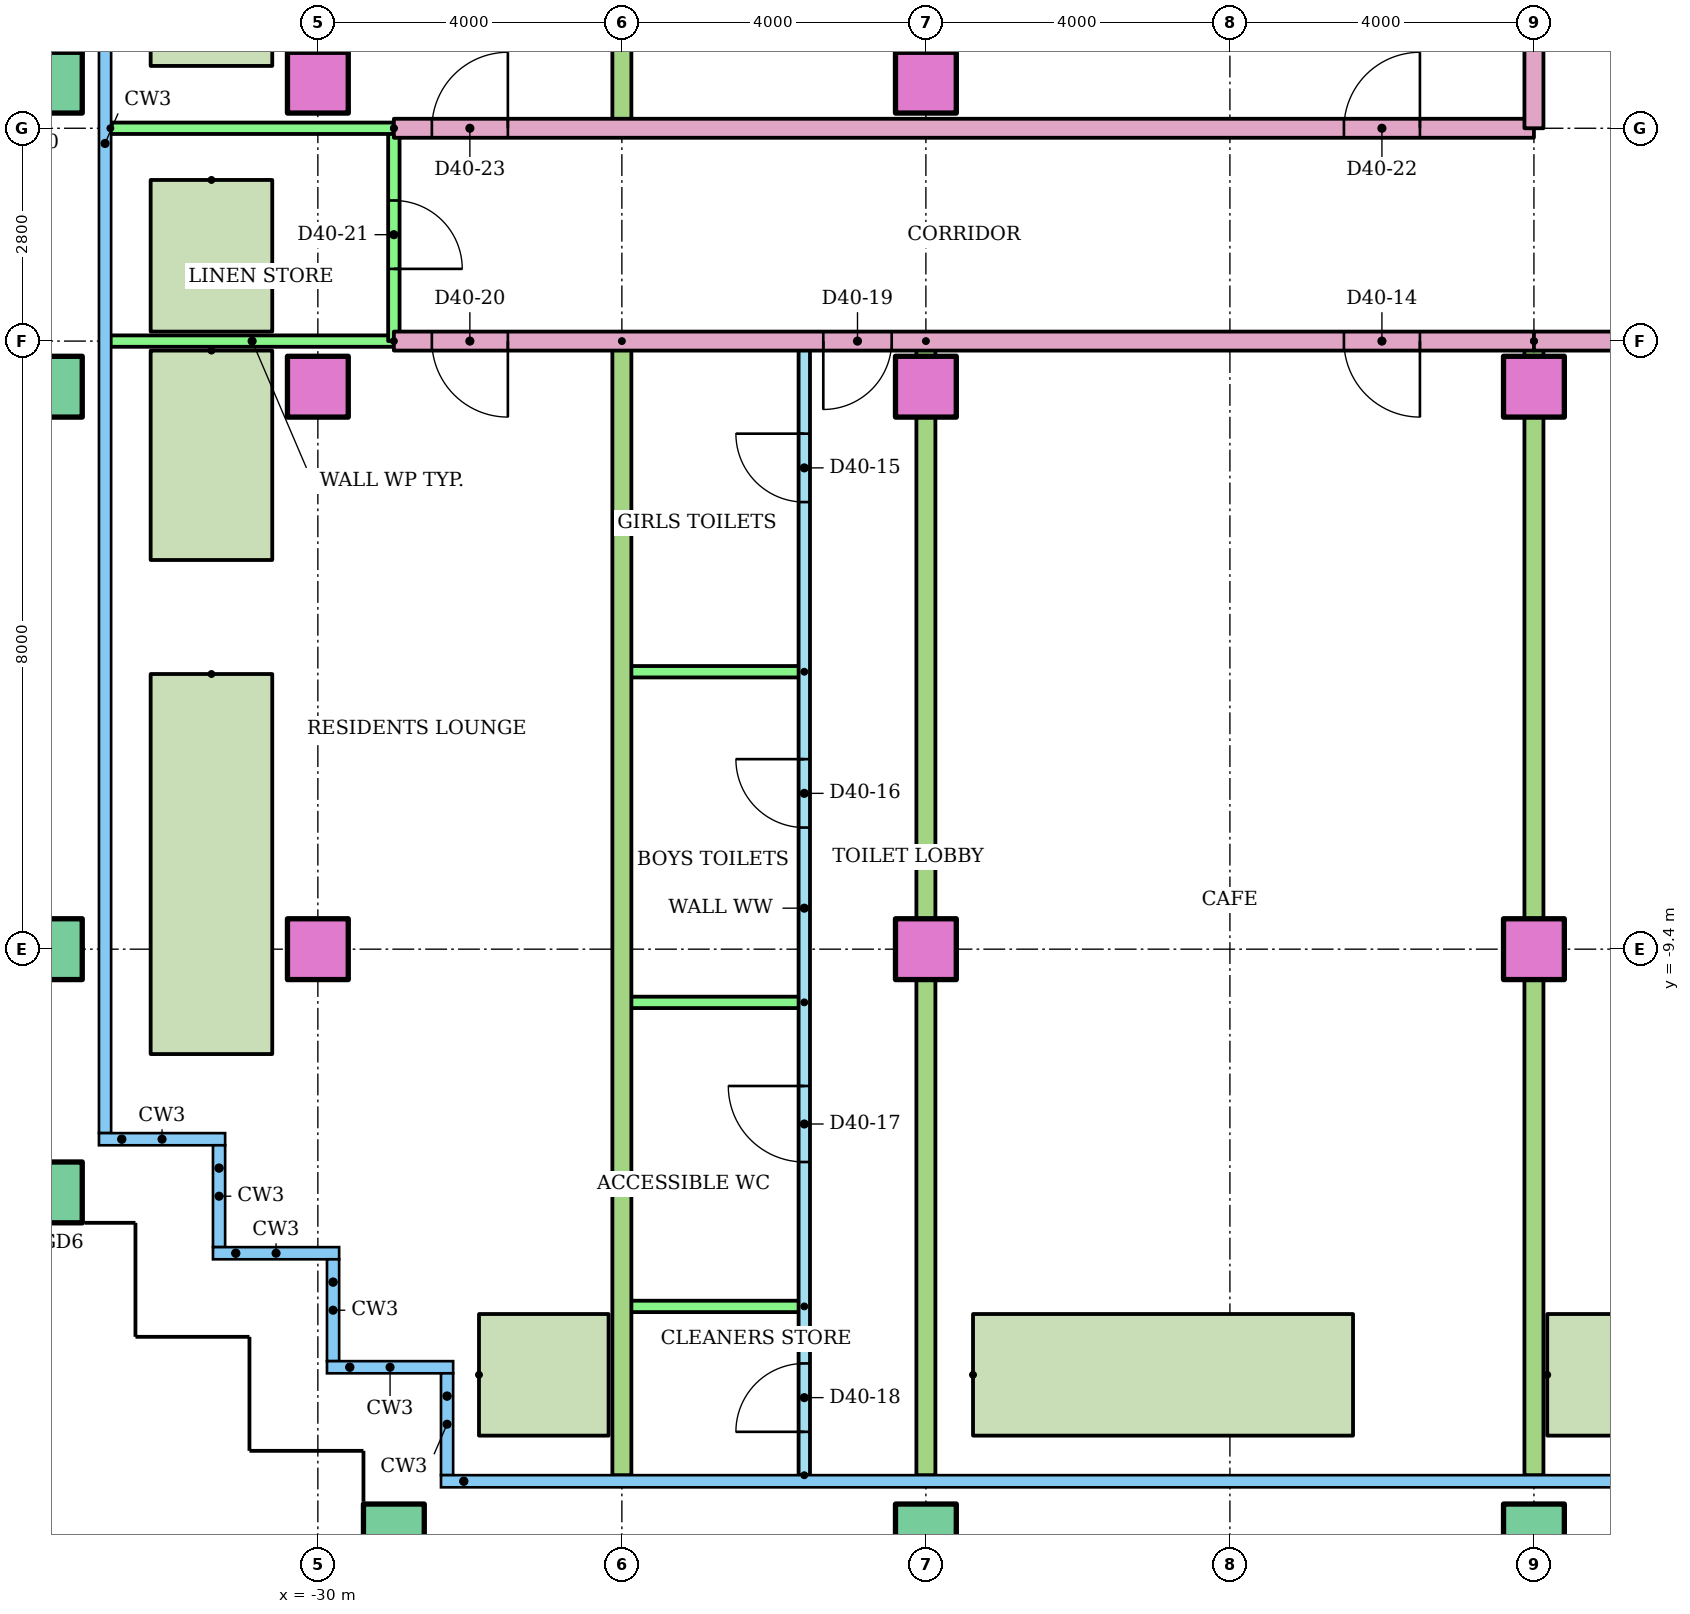
"""IFC4 building model, lengths in metres.
Left out: names, types, materials, properties, quantities, classifications, styles, units other than length and angle.
Written with IfcOpenShell. Run it as: python <this file> out.ifc"""

import sys

from ifc_helpers import new_model, si_unit, direction, frame, frame_2d, origin, origin_2d, place, context, subcontext, project, spatial, rectangle, hollow_rectangle, extrude, element, fill, save


model = new_model("IFC4")
c1 = context("Model", 3, precision=1e-05, world=origin(), true_north=direction((0.0, 1.0)))
c2 = subcontext(c1, "Body", "Model", "MODEL_VIEW")
j1 = project(units=[si_unit("LENGTHUNIT", "METRE"), si_unit("PLANEANGLEUNIT", "RADIAN")], contexts=[c1])
p1 = place(None, origin())
s1 = spatial("IfcSite", under=j1, at=p1, CompositionType="ELEMENT")
p2 = place(p1, origin())
s2 = spatial("IfcBuilding", under=s1, at=p2, CompositionType="ELEMENT")
p3 = place(p2, frame((0.0, 0.0, 151.8)))
s3 = spatial("IfcBuildingStorey", under=s2, at=p3, CompositionType="ELEMENT", Elevation=151.8)
p4 = place(p3, frame((-29.0, -17.1, 0.0)))
e1 = element("IfcColumn", 1, at=p4, inside=s3, PredefinedType="COLUMN", context=c2, shape_type="SweptSolid", body=[
    extrude(hollow_rectangle(XDim=0.8, YDim=0.8, WallThickness=0.04, at=origin_2d()), origin(), (0.0, 0.0, 1.0), 9.25),
])
p5 = place(p3, frame((-22.0, -17.1, 0.0)))
e2 = element("IfcColumn", 2, at=p5, inside=s3, PredefinedType="COLUMN", context=c2, shape_type="SweptSolid", body=[
    extrude(hollow_rectangle(XDim=0.8, YDim=0.8, WallThickness=0.04, at=origin_2d()), origin(), (0.0, 0.0, 1.0), 8.8),
])
p6 = place(p3, frame((-14.0, -17.1, 0.0)))
e3 = element("IfcColumn", 3, at=p6, inside=s3, PredefinedType="COLUMN", context=c2, shape_type="SweptSolid", body=[
    extrude(hollow_rectangle(XDim=0.8, YDim=0.8, WallThickness=0.04, at=origin_2d()), origin(), (0.0, 0.0, 1.0), 9.6),
])
for number, where in (
    (4, (-33.5, -12.6, 0.0)),
    (5, (-33.5, -9.4, 0.0)),
):
    element("IfcColumn", number, at=place(p3, frame(where)), inside=s3, PredefinedType="COLUMN", context=c2, shape_type="SweptSolid", body=[
        extrude(hollow_rectangle(XDim=0.8, YDim=0.8, WallThickness=0.04, at=origin_2d()), origin(), (0.0, 0.0, 1.0), 9.25),
    ])
p7 = place(p3, frame((-30.0, -9.4, 0.0)))
e6 = element("IfcColumn", 6, at=p7, inside=s3, PredefinedType="COLUMN", context=c2, shape_type="SweptSolid", body=[
    extrude(rectangle(XDim=0.8, YDim=0.8, at=origin_2d()), origin(), (0.0, 0.0, 1.0), 8.8),
])
for number, where in (
    (7, (-22.0, -9.4, 0.0)),
    (8, (-14.0, -9.4, 0.0)),
):
    element("IfcColumn", number, at=place(p3, frame(where)), inside=s3, PredefinedType="COLUMN", context=c2, shape_type="SweptSolid", body=[
        extrude(rectangle(XDim=0.8, YDim=0.8, at=origin_2d()), origin(), (0.0, 0.0, 1.0), 9.6),
    ])
p8 = place(p3, frame((-33.5, -2.0, 0.0)))
e9 = element("IfcColumn", 9, at=p8, inside=s3, PredefinedType="COLUMN", context=c2, shape_type="SweptSolid", body=[
    extrude(hollow_rectangle(XDim=0.8, YDim=0.8, WallThickness=0.04, at=origin_2d()), origin(), (0.0, 0.0, 1.0), 9.25),
])
p9 = place(p3, frame((-30.0, -2.0, 0.0)))
e10 = element("IfcColumn", 10, at=p9, inside=s3, PredefinedType="COLUMN", context=c2, shape_type="SweptSolid", body=[
    extrude(rectangle(XDim=0.8, YDim=0.8, at=origin_2d()), origin(), (0.0, 0.0, 1.0), 8.8),
])
for number, where in (
    (11, (-22.0, -2.0, 0.0)),
    (12, (-14.0, -2.0, 0.0)),
):
    element("IfcColumn", number, at=place(p3, frame(where)), inside=s3, PredefinedType="COLUMN", context=c2, shape_type="SweptSolid", body=[
        extrude(rectangle(XDim=0.8, YDim=0.8, at=origin_2d()), origin(), (0.0, 0.0, 1.0), 9.6),
    ])
p10 = place(p3, frame((-33.5, 2.0, 0.0)))
e13 = element("IfcColumn", 13, at=p10, inside=s3, PredefinedType="COLUMN", context=c2, shape_type="SweptSolid", body=[
    extrude(hollow_rectangle(XDim=0.8, YDim=0.8, WallThickness=0.04, at=origin_2d()), origin(), (0.0, 0.0, 1.0), 9.25),
])
p11 = place(p3, frame((-30.0, 2.0, 0.0)))
e14 = element("IfcColumn", 14, at=p11, inside=s3, PredefinedType="COLUMN", context=c2, shape_type="SweptSolid", body=[
    extrude(rectangle(XDim=0.8, YDim=0.8, at=origin_2d()), origin(), (0.0, 0.0, 1.0), 8.8),
])
p12 = place(p3, frame((-22.0, 2.0, 0.0)))
e15 = element("IfcColumn", 15, at=p12, inside=s3, PredefinedType="COLUMN", context=c2, shape_type="SweptSolid", body=[
    extrude(rectangle(XDim=0.8, YDim=0.8, at=origin_2d()), origin(), (0.0, 0.0, 1.0), 9.6),
])
for number, where, z_axis, x_axis in (
    (16, (-31.4, 7.22, 0.0), (0.0, 0.0, 1.0), (0.0, -1.0, 0.0)),
    (17, (-31.4, -5.78, 0.0), (0.0, 0.0, 1.0), (0.0, -1.0, 0.0)),
):
    element("IfcWall", number, at=place(p3, frame(where, z_axis=z_axis, x_axis=x_axis)), inside=s3, PredefinedType="STANDARD", context=c2, shape_type="SweptSolid", body=[
        extrude(rectangle(XDim=5.0, YDim=1.6, at=frame_2d((2.5, 0.0))), origin(), (0.0, 0.0, 1.0), 0.8),
    ])
p13 = place(p3, frame((-21.38, -15.0, 0.0)))
e18 = element("IfcWall", 18, at=p13, inside=s3, PredefinedType="STANDARD", context=c2, shape_type="SweptSolid", body=[
    extrude(rectangle(XDim=5.0, YDim=1.6, at=frame_2d((2.5, 0.0))), origin(), (0.0, 0.0, 1.0), 0.8),
])
p14 = place(p3, frame((-14.0, -1.4, 0.0), z_axis=(0.0, 0.0, 1.0), x_axis=(-1.0, 0.0, 0.0)))
e19 = element("IfcWall", 19, at=p14, inside=s3, PredefinedType="PARTITIONING", context=c2, shape_type="SweptSolid", body=[
    extrude(rectangle(XDim=15.0, YDim=0.25, at=frame_2d((7.5, 0.0))), origin(), (0.0, 0.0, 1.0), 8.8),
])
p15 = place(p14, frame((1.5, 0.0, 0.0)))
e20 = element("IfcOpeningElement", 20, at=p15, cuts=e19, PredefinedType="OPENING", context=c2, shape_type="SweptSolid", body=[
    extrude(rectangle(XDim=1.0, YDim=2.1, at=frame_2d((0.5, 1.05))), frame((0.0, 0.135, 0.0), z_axis=(0.0, -1.0, 0.0), x_axis=(1.0, 0.0, 0.0)), (0.0, 0.0, 1.0), 0.27),
])
p16 = place(p14, frame((8.45, 0.0, 0.0)))
e21 = element("IfcOpeningElement", 21, at=p16, cuts=e19, PredefinedType="OPENING", context=c2, shape_type="SweptSolid", body=[
    extrude(rectangle(XDim=0.9, YDim=2.1, at=frame_2d((0.45, 1.05))), frame((0.0, 0.135, 0.0), z_axis=(0.0, -1.0, 0.0), x_axis=(1.0, 0.0, 0.0)), (0.0, 0.0, 1.0), 0.27),
])
p17 = place(p14, frame((13.5, 0.0, 0.0)))
e22 = element("IfcOpeningElement", 22, at=p17, cuts=e19, PredefinedType="OPENING", context=c2, shape_type="SweptSolid", body=[
    extrude(rectangle(XDim=1.0, YDim=2.1, at=frame_2d((0.5, 1.05))), frame((0.0, 0.135, 0.0), z_axis=(0.0, -1.0, 0.0), x_axis=(1.0, 0.0, 0.0)), (0.0, 0.0, 1.0), 0.27),
])
p18 = place(p3, frame((-29.0, -1.4, 0.0), z_axis=(0.0, 0.0, 1.0), x_axis=(-1.0, 0.0, 0.0)))
e23 = element("IfcWall", 23, at=p18, inside=s3, PredefinedType="PARTITIONING", context=c2, shape_type="SweptSolid", body=[
    extrude(rectangle(XDim=3.73, YDim=0.15, at=frame_2d((1.865, 0.0))), origin(), (0.0, 0.0, 1.0), 8.8),
])
p19 = place(p3, frame((-29.0, 1.4, 0.0), z_axis=(0.0, 0.0, 1.0), x_axis=(0.0, -1.0, 0.0)))
e24 = element("IfcWall", 24, at=p19, inside=s3, PredefinedType="PARTITIONING", context=c2, shape_type="SweptSolid", body=[
    extrude(rectangle(XDim=2.8, YDim=0.15, at=frame_2d((1.4, 0.0))), origin(), (0.0, 0.0, 1.0), 8.8),
])
p20 = place(p19, frame((0.95, 0.0, 0.0)))
e25 = element("IfcOpeningElement", 25, at=p20, cuts=e24, PredefinedType="OPENING", context=c2, shape_type="SweptSolid", body=[
    extrude(rectangle(XDim=0.9, YDim=2.1, at=frame_2d((0.45, 1.05))), frame((0.0, 0.085, 0.0), z_axis=(0.0, -1.0, 0.0), x_axis=(1.0, 0.0, 0.0)), (0.0, 0.0, 1.0), 0.17),
])
p21 = place(p3, frame((-23.6, -16.321, 0.0), z_axis=(0.0, 0.0, 1.0), x_axis=(0.0, 1.0, 0.0)))
e26 = element("IfcWall", 26, at=p21, inside=s3, PredefinedType="PARTITIONING", context=c2, shape_type="SweptSolid", body=[
    extrude(rectangle(XDim=14.921, YDim=0.15, at=frame_2d((7.46, 0.0))), origin(), (0.0, 0.0, 1.0), 8.8),
])
p22 = place(p21, frame((12.803, 0.0, 0.0)))
e27 = element("IfcOpeningElement", 27, at=p22, cuts=e26, PredefinedType="OPENING", context=c2, shape_type="SweptSolid", body=[
    extrude(rectangle(XDim=0.9, YDim=2.1, at=frame_2d((0.45, 1.05))), frame((0.0, 0.085, 0.0), z_axis=(0.0, -1.0, 0.0), x_axis=(1.0, 0.0, 0.0)), (0.0, 0.0, 1.0), 0.17),
])
p23 = place(p21, frame((8.521, 0.0, 0.0)))
e28 = element("IfcOpeningElement", 28, at=p23, cuts=e26, PredefinedType="OPENING", context=c2, shape_type="SweptSolid", body=[
    extrude(rectangle(XDim=0.9, YDim=2.1, at=frame_2d((0.45, 1.05))), frame((0.0, 0.085, 0.0), z_axis=(0.0, -1.0, 0.0), x_axis=(1.0, 0.0, 0.0)), (0.0, 0.0, 1.0), 0.17),
])
p24 = place(p21, frame((4.121, 0.0, 0.0)))
e29 = element("IfcOpeningElement", 29, at=p24, cuts=e26, PredefinedType="OPENING", context=c2, shape_type="SweptSolid", body=[
    extrude(rectangle(XDim=1.0, YDim=2.1, at=frame_2d((0.5, 1.05))), frame((0.0, 0.085, 0.0), z_axis=(0.0, -1.0, 0.0), x_axis=(1.0, 0.0, 0.0)), (0.0, 0.0, 1.0), 0.17),
])
p25 = place(p21, frame((0.571, 0.0, 0.0)))
e30 = element("IfcOpeningElement", 30, at=p25, cuts=e26, PredefinedType="OPENING", context=c2, shape_type="SweptSolid", body=[
    extrude(rectangle(XDim=0.9, YDim=2.1, at=frame_2d((0.45, 1.05))), frame((0.0, 0.085, 0.0), z_axis=(0.0, -1.0, 0.0), x_axis=(1.0, 0.0, 0.0)), (0.0, 0.0, 1.0), 0.17),
])
for number, where, z_axis, x_axis in (
    (31, (-23.6, -5.75, 0.0), (0.0, 0.0, 1.0), (-1.0, 0.0, 0.0)),
    (32, (-23.6, -10.1, 0.0), (0.0, 0.0, 1.0), (-1.0, 0.0, 0.0)),
    (33, (-23.6, -14.1, 0.0), (0.0, 0.0, 1.0), (-1.0, 0.0, 0.0)),
):
    element("IfcWall", number, at=place(p3, frame(where, z_axis=z_axis, x_axis=x_axis)), inside=s3, PredefinedType="PARTITIONING", context=c2, shape_type="SweptSolid", body=[
        extrude(rectangle(XDim=2.4, YDim=0.15, at=frame_2d((1.2, 0.0))), origin(), (0.0, 0.0, 1.0), 8.8),
    ])
for number, where, z_axis, x_axis in (
    (34, (-26.0, -1.4, 0.0), (0.0, 0.0, 1.0), (0.0, -1.0, 0.0)),
    (35, (-22.0, -1.4, 0.0), (0.0, 0.0, 1.0), (0.0, -1.0, 0.0)),
    (36, (-14.0, -1.4, 0.0), (0.0, 0.0, 1.0), (0.0, -1.0, 0.0)),
):
    element("IfcWall", number, at=place(p3, frame(where, z_axis=z_axis, x_axis=x_axis)), inside=s3, PredefinedType="PARTITIONING", context=c2, shape_type="SweptSolid", body=[
        extrude(rectangle(XDim=14.921, YDim=0.25, at=frame_2d((7.46, 0.0))), origin(), (0.0, 0.0, 1.0), 8.8),
    ])
p26 = place(p3, frame((-29.0, 1.4, 0.0)))
e37 = element("IfcWall", 37, at=p26, inside=s3, PredefinedType="PARTITIONING", context=c2, shape_type="SweptSolid", body=[
    extrude(rectangle(XDim=15.0, YDim=0.25, at=frame_2d((7.5, 0.0))), origin(), (0.0, 0.0, 1.0), 8.8),
])
p27 = place(p26, frame((12.5, 0.0, 0.0)))
e38 = element("IfcOpeningElement", 38, at=p27, cuts=e37, PredefinedType="OPENING", context=c2, shape_type="SweptSolid", body=[
    extrude(rectangle(XDim=1.0, YDim=2.1, at=frame_2d((0.5, 1.05))), frame((0.0, 0.135, 0.0), z_axis=(0.0, -1.0, 0.0), x_axis=(1.0, 0.0, 0.0)), (0.0, 0.0, 1.0), 0.27),
])
p28 = place(p26, frame((0.5, 0.0, 0.0)))
e39 = element("IfcOpeningElement", 39, at=p28, cuts=e37, PredefinedType="OPENING", context=c2, shape_type="SweptSolid", body=[
    extrude(rectangle(XDim=1.0, YDim=2.1, at=frame_2d((0.5, 1.05))), frame((0.0, 0.135, 0.0), z_axis=(0.0, -1.0, 0.0), x_axis=(1.0, 0.0, 0.0)), (0.0, 0.0, 1.0), 0.27),
])
p29 = place(p3, frame((-32.73, 1.4, 0.0)))
e40 = element("IfcWall", 40, at=p29, inside=s3, PredefinedType="PARTITIONING", context=c2, shape_type="SweptSolid", body=[
    extrude(rectangle(XDim=3.73, YDim=0.15, at=frame_2d((1.865, 0.0))), origin(), (0.0, 0.0, 1.0), 8.8),
])
p30 = place(p3, frame((-26.0, 18.721, 0.0), z_axis=(0.0, 0.0, 1.0), x_axis=(0.0, -1.0, 0.0)))
e41 = element("IfcWall", 41, at=p30, inside=s3, PredefinedType="PARTITIONING", context=c2, shape_type="SweptSolid", body=[
    extrude(rectangle(XDim=17.321, YDim=0.25, at=frame_2d((8.661, 0.0))), origin(), (0.0, 0.0, 1.0), 8.8),
])
p31 = place(p3, frame((14.0, -1.4, 0.0), z_axis=(0.0, 0.0, 1.0), x_axis=(-1.0, 0.0, 0.0)))
e42 = element("IfcWall", 42, at=p31, inside=s3, PredefinedType="PARTITIONING", context=c2, shape_type="SweptSolid", body=[
    extrude(rectangle(XDim=28.0, YDim=0.25, at=frame_2d((14.0, 0.0))), origin(), (0.0, 0.0, 1.0), 8.8),
])
p32 = place(p31, frame((25.5, 0.0, 0.0)))
e43 = element("IfcOpeningElement", 43, at=p32, cuts=e42, PredefinedType="OPENING", context=c2, shape_type="SweptSolid", body=[
    extrude(rectangle(XDim=1.0, YDim=2.1, at=frame_2d((0.5, 1.05))), frame((0.0, 0.135, 0.0), z_axis=(0.0, -1.0, 0.0), x_axis=(1.0, 0.0, 0.0)), (0.0, 0.0, 1.0), 0.27),
])
p33 = place(p31, frame((9.5, 0.0, 0.0)))
e44 = element("IfcOpeningElement", 44, at=p33, cuts=e42, PredefinedType="OPENING", context=c2, shape_type="SweptSolid", body=[
    extrude(rectangle(XDim=1.0, YDim=2.1, at=frame_2d((0.5, 1.05))), frame((0.0, 0.135, 0.0), z_axis=(0.0, -1.0, 0.0), x_axis=(1.0, 0.0, 0.0)), (0.0, 0.0, 1.0), 0.27),
])
p34 = place(p31, frame((5.5, 0.0, 0.0)))
e45 = element("IfcOpeningElement", 45, at=p34, cuts=e42, PredefinedType="OPENING", context=c2, shape_type="SweptSolid", body=[
    extrude(rectangle(XDim=1.0, YDim=2.1, at=frame_2d((0.5, 1.05))), frame((0.0, 0.135, 0.0), z_axis=(0.0, -1.0, 0.0), x_axis=(1.0, 0.0, 0.0)), (0.0, 0.0, 1.0), 0.27),
])
p35 = place(p3, frame((-14.0, 3.0, 0.0), z_axis=(0.0, 0.0, 1.0), x_axis=(0.0, -1.0, 0.0)))
e46 = element("IfcWall", 46, at=p35, inside=s3, PredefinedType="PARTITIONING", context=c2, shape_type="SweptSolid", body=[
    extrude(rectangle(XDim=1.6, YDim=0.25, at=frame_2d((0.8, 0.0))), origin(), (0.0, 0.0, 1.0), 8.8),
])
p36 = place(p3, frame((-31.4, 0.72, 0.0), z_axis=(0.0, 0.0, 1.0), x_axis=(0.0, -1.0, 0.0)))
e47 = element("IfcWall", 47, at=p36, inside=s3, PredefinedType="STANDARD", context=c2, shape_type="SweptSolid", body=[
    extrude(rectangle(XDim=1.995, YDim=1.6, at=frame_2d((0.998, 0.0))), origin(), (0.0, 0.0, 1.0), 0.8),
])
p37 = place(p3, frame((-31.4, -1.525, 0.0), z_axis=(0.0, 0.0, 1.0), x_axis=(0.0, -1.0, 0.0)))
e48 = element("IfcWall", 48, at=p37, inside=s3, PredefinedType="STANDARD", context=c2, shape_type="SweptSolid", body=[
    extrude(rectangle(XDim=2.755, YDim=1.6, at=frame_2d((1.377, 0.0))), origin(), (0.0, 0.0, 1.0), 0.8),
])
p38 = place(p3, frame((-27.88, -15.0, 0.0)))
e49 = element("IfcWall", 49, at=p38, inside=s3, PredefinedType="STANDARD", context=c2, shape_type="SweptSolid", body=[
    extrude(rectangle(XDim=1.705, YDim=1.6, at=frame_2d((0.853, 0.0))), origin(), (0.0, 0.0, 1.0), 0.8),
])
p39 = place(p3, frame((-13.825, -15.0, 0.0)))
e50 = element("IfcWall", 50, at=p39, inside=s3, PredefinedType="STANDARD", context=c2, shape_type="SweptSolid", body=[
    extrude(rectangle(XDim=3.945, YDim=1.6, at=frame_2d((1.973, 0.0))), origin(), (0.0, 0.0, 1.0), 0.8),
])
p40 = place(p15, origin())
e51 = element("IfcDoor", 51, at=p40, inside=s3, OperationType="SINGLE_SWING_LEFT", PredefinedType="DOOR", context=c2, shape_type="SweptSolid", body=[
    extrude(rectangle(XDim=1.0, YDim=2.1, at=frame_2d((0.5, 1.05))), frame((0.0, 0.025, 0.0), z_axis=(0.0, -1.0, 0.0), x_axis=(1.0, 0.0, 0.0)), (0.0, 0.0, 1.0), 0.05),
])
fill(e20, e51)
p41 = place(p22, origin())
e52 = element("IfcDoor", 52, at=p41, inside=s3, OperationType="SINGLE_SWING_RIGHT", PredefinedType="DOOR", context=c2, shape_type="SweptSolid", body=[
    extrude(rectangle(XDim=0.9, YDim=2.1, at=frame_2d((0.45, 1.05))), frame((0.0, 0.025, 0.0), z_axis=(0.0, -1.0, 0.0), x_axis=(1.0, 0.0, 0.0)), (0.0, 0.0, 1.0), 0.05),
])
fill(e27, e52)
p42 = place(p23, origin())
e53 = element("IfcDoor", 53, at=p42, inside=s3, OperationType="SINGLE_SWING_RIGHT", PredefinedType="DOOR", context=c2, shape_type="SweptSolid", body=[
    extrude(rectangle(XDim=0.9, YDim=2.1, at=frame_2d((0.45, 1.05))), frame((0.0, 0.025, 0.0), z_axis=(0.0, -1.0, 0.0), x_axis=(1.0, 0.0, 0.0)), (0.0, 0.0, 1.0), 0.05),
])
fill(e28, e53)
p43 = place(p24, origin())
e54 = element("IfcDoor", 54, at=p43, inside=s3, OperationType="SINGLE_SWING_RIGHT", PredefinedType="DOOR", context=c2, shape_type="SweptSolid", body=[
    extrude(rectangle(XDim=1.0, YDim=2.1, at=frame_2d((0.5, 1.05))), frame((0.0, 0.025, 0.0), z_axis=(0.0, -1.0, 0.0), x_axis=(1.0, 0.0, 0.0)), (0.0, 0.0, 1.0), 0.05),
])
fill(e29, e54)
p44 = place(p25, origin())
e55 = element("IfcDoor", 55, at=p44, inside=s3, OperationType="SINGLE_SWING_LEFT", PredefinedType="DOOR", context=c2, shape_type="SweptSolid", body=[
    extrude(rectangle(XDim=0.9, YDim=2.1, at=frame_2d((0.45, 1.05))), frame((0.0, 0.025, 0.0), z_axis=(0.0, -1.0, 0.0), x_axis=(1.0, 0.0, 0.0)), (0.0, 0.0, 1.0), 0.05),
])
fill(e30, e55)
p45 = place(p16, origin())
e56 = element("IfcDoor", 56, at=p45, inside=s3, OperationType="SINGLE_SWING_RIGHT", PredefinedType="DOOR", context=c2, shape_type="SweptSolid", body=[
    extrude(rectangle(XDim=0.9, YDim=2.1, at=frame_2d((0.45, 1.05))), frame((0.0, 0.025, 0.0), z_axis=(0.0, -1.0, 0.0), x_axis=(1.0, 0.0, 0.0)), (0.0, 0.0, 1.0), 0.05),
])
fill(e21, e56)
p46 = place(p17, origin())
e57 = element("IfcDoor", 57, at=p46, inside=s3, OperationType="SINGLE_SWING_LEFT", PredefinedType="DOOR", context=c2, shape_type="SweptSolid", body=[
    extrude(rectangle(XDim=1.0, YDim=2.1, at=frame_2d((0.5, 1.05))), frame((0.0, 0.025, 0.0), z_axis=(0.0, -1.0, 0.0), x_axis=(1.0, 0.0, 0.0)), (0.0, 0.0, 1.0), 0.05),
])
fill(e22, e57)
p47 = place(p20, origin())
e58 = element("IfcDoor", 58, at=p47, inside=s3, OperationType="SINGLE_SWING_RIGHT", PredefinedType="DOOR", context=c2, shape_type="SweptSolid", body=[
    extrude(rectangle(XDim=0.9, YDim=2.1, at=frame_2d((0.45, 1.05))), frame((0.0, 0.025, 0.0), z_axis=(0.0, -1.0, 0.0), x_axis=(1.0, 0.0, 0.0)), (0.0, 0.0, 1.0), 0.05),
])
fill(e25, e58)
p48 = place(p27, origin())
e59 = element("IfcDoor", 59, at=p48, inside=s3, OperationType="SINGLE_SWING_RIGHT", PredefinedType="DOOR", context=c2, shape_type="SweptSolid", body=[
    extrude(rectangle(XDim=1.0, YDim=2.1, at=frame_2d((0.5, 1.05))), frame((0.0, 0.025, 0.0), z_axis=(0.0, -1.0, 0.0), x_axis=(1.0, 0.0, 0.0)), (0.0, 0.0, 1.0), 0.05),
])
fill(e38, e59)
p49 = place(p28, origin())
e60 = element("IfcDoor", 60, at=p49, inside=s3, OperationType="SINGLE_SWING_RIGHT", PredefinedType="DOOR", context=c2, shape_type="SweptSolid", body=[
    extrude(rectangle(XDim=1.0, YDim=2.1, at=frame_2d((0.5, 1.05))), frame((0.0, 0.025, 0.0), z_axis=(0.0, -1.0, 0.0), x_axis=(1.0, 0.0, 0.0)), (0.0, 0.0, 1.0), 0.05),
])
fill(e39, e60)
save(model, sys.argv[1])
